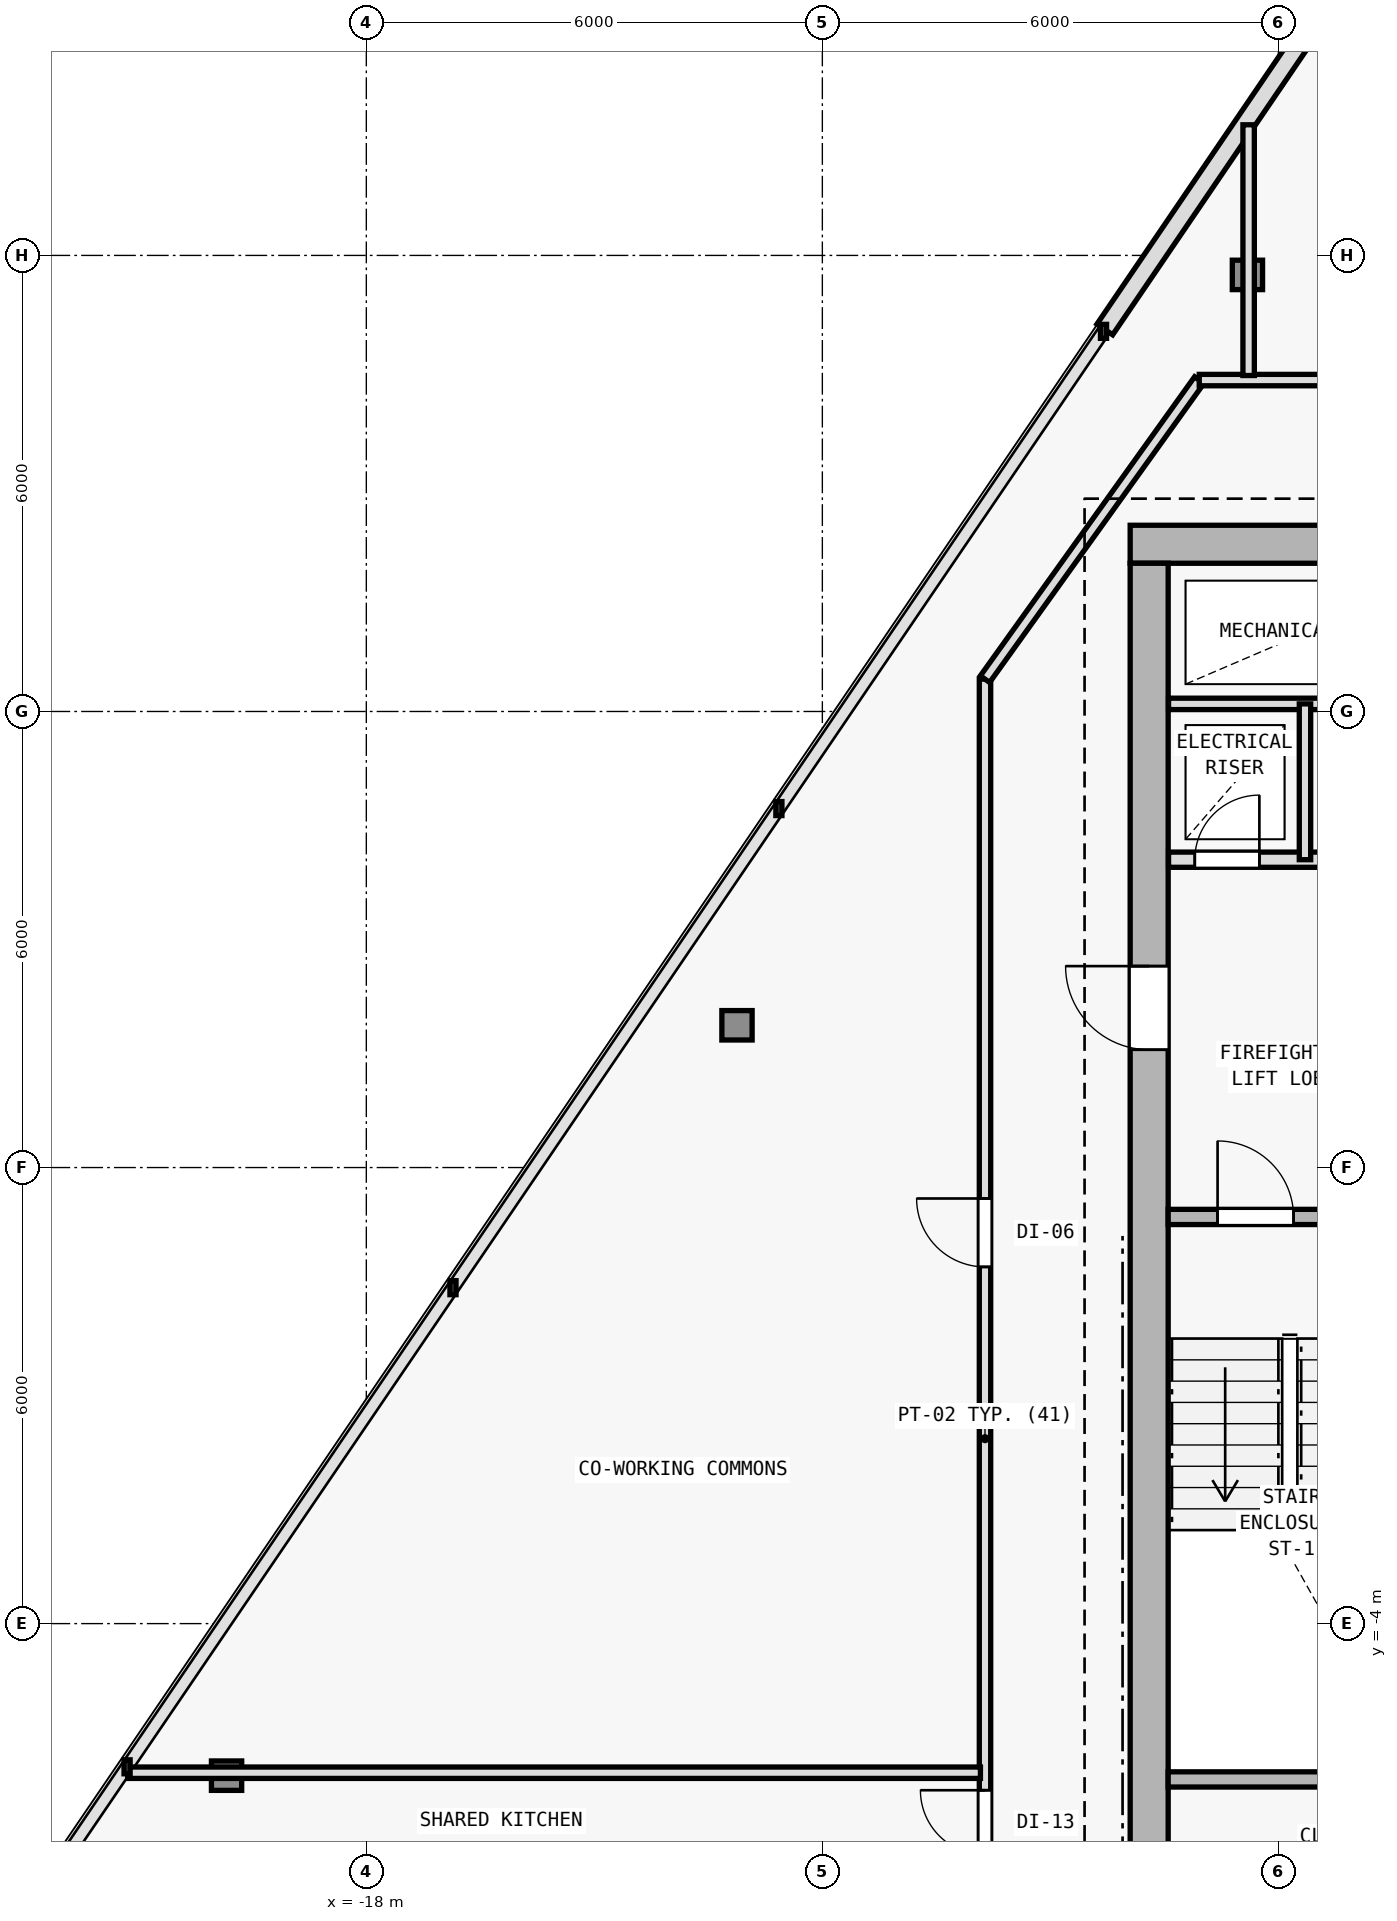
"""IFC4 building model, lengths in metres.
Left out: names, types, materials, properties, quantities, classifications, styles, units other than length and angle.
Written with IfcOpenShell. Run it as: python <this file> out.ifc"""

import sys

from ifc_helpers import new_model, si_unit, direction, frame, frame_2d, origin, origin_2d, place, context, subcontext, project, spatial, rectangle, i_section, extrude, element, fill, save


model = new_model("IFC4")
c1 = context("Model", 3, precision=1e-05, world=origin(), true_north=direction((0.0, 1.0)))
c2 = subcontext(c1, "Body", "Model", "MODEL_VIEW")
j1 = project(units=[si_unit("LENGTHUNIT", "METRE"), si_unit("PLANEANGLEUNIT", "RADIAN")], contexts=[c1])
p1 = place(None, origin())
s1 = spatial("IfcSite", under=j1, at=p1, CompositionType="ELEMENT")
p2 = place(p1, origin())
s2 = spatial("IfcBuilding", under=s1, at=p2, CompositionType="ELEMENT")
p3 = place(p2, frame((0.0, 0.0, 212.7)))
s3 = spatial("IfcBuildingStorey", under=s2, at=p3, CompositionType="ELEMENT", Elevation=212.7)
for number, where, z_axis, x_axis in (
    (1, (-7.7, 10.2, 0.0), (0.0, 0.0, 1.0), (1.0, 0.0, 0.0)),
    (2, (-7.7, 2.0, 0.0), (0.0, 0.0, 1.0), (1.0, 0.0, 0.0)),
):
    element("IfcColumn", number, at=place(p3, frame(where, z_axis=z_axis, x_axis=x_axis)), inside=s3, PredefinedType="COLUMN", context=c2, shape_type="SweptSolid", body=[
        extrude(i_section(OverallWidth=0.398, OverallDepth=0.387, WebThickness=0.013, FlangeThickness=0.022, FilletRadius=0.015, at=origin_2d()), origin(), (0.0, 0.0, 1.0), 3.6),
    ])
p4 = place(p3, frame((-6.407, 13.744, 0.006), z_axis=(0.008843163607, -0.002516900411, 0.999957730942), x_axis=(0.273743828055, 0.961802639112, 0.0)))
e3 = element("IfcColumn", 3, at=p4, inside=s3, PredefinedType="COLUMN", context=c2, shape_type="SweptSolid", body=[
    extrude(i_section(OverallWidth=0.398, OverallDepth=0.387, WebThickness=0.013, FlangeThickness=0.022, FilletRadius=0.015, at=origin_2d()), origin(), (0.0, 0.0, 1.0), 3.589),
])
p5 = place(p3, frame((-13.123, 3.872, 0.006), z_axis=(0.017003572908, 0.009522000828, 0.999810086971), x_axis=(-0.488603368932, 0.87250601595, 0.0)))
e4 = element("IfcColumn", 4, at=p5, inside=s3, PredefinedType="COLUMN", context=c2, shape_type="SweptSolid", body=[
    extrude(i_section(OverallWidth=0.398, OverallDepth=0.387, WebThickness=0.013, FlangeThickness=0.022, FilletRadius=0.015, at=origin_2d()), origin(), (0.0, 0.0, 1.0), 3.59),
])
p6 = place(p3, frame((-19.839, -6.0, 0.006), z_axis=(0.025224200599, 0.021552753612, 0.99944945771), x_axis=(-0.649609258817, 0.760268249278, 0.0)))
e5 = element("IfcColumn", 5, at=p6, inside=s3, PredefinedType="COLUMN", context=c2, shape_type="SweptSolid", body=[
    extrude(i_section(OverallWidth=0.398, OverallDepth=0.387, WebThickness=0.013, FlangeThickness=0.022, FilletRadius=0.015, at=origin_2d()), origin(), (0.0, 0.0, 1.0), 3.591),
])
p7 = place(p3, frame((-8.284, 13.026, 0.0), z_axis=(0.0, 0.0, 1.0), x_axis=(0.562468945091, 0.826818411629, 0.0)))
e6 = element("IfcWall", 6, at=p7, inside=s3, PredefinedType="SOLIDWALL", context=c2, shape_type="SweptSolid", body=[
    extrude(rectangle(XDim=10.714, YDim=0.25, at=frame_2d((5.357, 0.0))), origin(), (0.0, 0.0, 1.0), 3.35),
])
p8 = place(p7, frame((4.657, 0.0, 0.62)))
e7 = element("IfcOpeningElement", 7, at=p8, cuts=e6, PredefinedType="OPENING", context=c2, shape_type="SweptSolid", body=[
    extrude(rectangle(XDim=1.4, YDim=2.0, at=frame_2d((0.7, 1.0))), frame((0.0, 0.135, 0.0), z_axis=(0.0, -1.0, 0.0), x_axis=(1.0, 0.0, 0.0)), (0.0, 0.0, 1.0), 0.27),
])
p9 = place(p3, frame((7.95, 10.2, 0.0), z_axis=(0.0, 0.0, 1.0), x_axis=(-1.0, 0.0, 0.0)))
e8 = element("IfcWall", 8, at=p9, inside=s3, PredefinedType="SHEAR", context=c2, shape_type="SweptSolid", body=[
    extrude(rectangle(XDim=15.9, YDim=0.5, at=frame_2d((7.95, 0.0))), origin(), (0.0, 0.0, 1.0), 3.35),
])
p10 = place(p9, frame((4.4, 0.0, 0.0)))
e9 = element("IfcOpeningElement", 9, at=p10, cuts=e8, PredefinedType="OPENING", context=c2, shape_type="SweptSolid", body=[
    extrude(rectangle(XDim=1.1, YDim=2.15, at=frame_2d((0.55, 1.075))), frame((0.0, 0.26, 0.0), z_axis=(0.0, -1.0, 0.0), x_axis=(1.0, 0.0, 0.0)), (0.0, 0.0, 1.0), 0.52),
])
p11 = place(p3, frame((-7.7, -9.15, 0.0), z_axis=(0.0, 0.0, 1.0), x_axis=(0.0, 1.0, 0.0)))
e10 = element("IfcWall", 10, at=p11, inside=s3, PredefinedType="SHEAR", context=c2, shape_type="SweptSolid", body=[
    extrude(rectangle(XDim=19.1, YDim=0.5, at=frame_2d((9.55, 0.0))), origin(), (0.0, 0.0, 1.0), 3.35),
])
p12 = place(p11, frame((12.7, 0.0, 0.0)))
e11 = element("IfcOpeningElement", 11, at=p12, cuts=e10, PredefinedType="OPENING", context=c2, shape_type="SweptSolid", body=[
    extrude(rectangle(XDim=1.1, YDim=2.15, at=frame_2d((0.55, 1.075))), frame((0.0, 0.26, 0.0), z_axis=(0.0, -1.0, 0.0), x_axis=(1.0, 0.0, 0.0)), (0.0, 0.0, 1.0), 0.52),
])
p13 = place(p3, frame((-7.45, 1.35, 0.0), z_axis=(0.0, 0.0, 1.0), x_axis=(1.0, 0.0, 0.0)))
e12 = element("IfcWall", 12, at=p13, inside=s3, PredefinedType="SOLIDWALL", context=c2, shape_type="SweptSolid", body=[
    extrude(rectangle(XDim=3.4, YDim=0.2, at=frame_2d((1.7, 0.0))), origin(), (0.0, 0.0, 1.0), 3.35),
])
p14 = place(p13, frame((0.65, 0.0, 0.0)))
e13 = element("IfcOpeningElement", 13, at=p14, cuts=e12, PredefinedType="OPENING", context=c2, shape_type="SweptSolid", body=[
    extrude(rectangle(XDim=1.0, YDim=2.15, at=frame_2d((0.5, 1.075))), frame((0.0, 0.11, 0.0), z_axis=(0.0, -1.0, 0.0), x_axis=(1.0, 0.0, 0.0)), (0.0, 0.0, 1.0), 0.22),
])
p15 = place(p3, frame((-7.445, 6.05, 0.0), z_axis=(0.0, 0.0, 1.0), x_axis=(1.0, 0.0, 0.0)))
e14 = element("IfcWall", 14, at=p15, inside=s3, PredefinedType="SOLIDWALL", context=c2, shape_type="SweptSolid", body=[
    extrude(rectangle(XDim=3.595, YDim=0.2, at=frame_2d((1.797, 0.0))), origin(), (0.0, 0.0, 1.0), 3.35),
])
p16 = place(p15, frame((0.345, 0.0, 0.0)))
e15 = element("IfcOpeningElement", 15, at=p16, cuts=e14, PredefinedType="OPENING", context=c2, shape_type="SweptSolid", body=[
    extrude(rectangle(XDim=0.85, YDim=2.1, at=frame_2d((0.425, 1.05))), frame((0.0, 0.11, 0.0), z_axis=(0.0, -1.0, 0.0), x_axis=(1.0, 0.0, 0.0)), (0.0, 0.0, 1.0), 0.22),
])
p17 = place(p15, frame((2.145, 0.0, 0.0)))
e16 = element("IfcOpeningElement", 16, at=p17, cuts=e14, PredefinedType="OPENING", context=c2, shape_type="SweptSolid", body=[
    extrude(rectangle(XDim=0.85, YDim=2.1, at=frame_2d((0.425, 1.05))), frame((0.0, 0.11, 0.0), z_axis=(0.0, -1.0, 0.0), x_axis=(1.0, 0.0, 0.0)), (0.0, 0.0, 1.0), 0.22),
])
p18 = place(p3, frame((-7.445, 8.1, 0.0), z_axis=(0.0, 0.0, 1.0), x_axis=(1.0, 0.0, 0.0)))
e17 = element("IfcWall", 17, at=p18, inside=s3, PredefinedType="PARTITIONING", context=c2, shape_type="SweptSolid", body=[
    extrude(rectangle(XDim=3.595, YDim=0.15, at=frame_2d((1.797, 0.0))), origin(), (0.0, 0.0, 1.0), 3.35),
])
p19 = place(p3, frame((-5.65, 6.05, 0.0), z_axis=(0.0, 0.0, 1.0), x_axis=(0.0, 1.0, 0.0)))
e18 = element("IfcWall", 18, at=p19, inside=s3, PredefinedType="PARTITIONING", context=c2, shape_type="SweptSolid", body=[
    extrude(rectangle(XDim=2.05, YDim=0.15, at=frame_2d((1.025, 0.0))), origin(), (0.0, 0.0, 1.0), 3.35),
])
p20 = place(p3, frame((-7.45, -6.05, 0.0), z_axis=(0.0, 0.0, 1.0), x_axis=(1.0, 0.0, 0.0)))
e19 = element("IfcWall", 19, at=p20, inside=s3, PredefinedType="SOLIDWALL", context=c2, shape_type="SweptSolid", body=[
    extrude(rectangle(XDim=3.4, YDim=0.2, at=frame_2d((1.7, 0.0))), origin(), (0.0, 0.0, 1.0), 3.35),
])
p21 = place(p3, frame((-9.86, -11.56, 0.0), z_axis=(0.0, 0.0, 1.0), x_axis=(0.0, 1.0, 0.0)))
e20 = element("IfcWall", 20, at=p21, inside=s3, PredefinedType="PARTITIONING", context=c2, shape_type="SweptSolid", body=[
    extrude(rectangle(XDim=19.986, YDim=0.15, at=frame_2d((9.993, 0.0))), origin(), (0.0, 0.0, 1.0), 2.825),
])
p22 = place(p21, frame((4.518, 0.0, 0.0)))
e21 = element("IfcOpeningElement", 21, at=p22, cuts=e20, PredefinedType="OPENING", context=c2, shape_type="SweptSolid", body=[
    extrude(rectangle(XDim=0.85, YDim=2.1, at=frame_2d((0.425, 1.05))), frame((0.0, 0.085, 0.0), z_axis=(0.0, -1.0, 0.0), x_axis=(1.0, 0.0, 0.0)), (0.0, 0.0, 1.0), 0.17),
])
p23 = place(p21, frame((3.17, 0.0, 0.0)))
e22 = element("IfcOpeningElement", 22, at=p23, cuts=e20, PredefinedType="OPENING", context=c2, shape_type="SweptSolid", body=[
    extrude(rectangle(XDim=0.85, YDim=2.1, at=frame_2d((0.425, 1.05))), frame((0.0, 0.085, 0.0), z_axis=(0.0, -1.0, 0.0), x_axis=(1.0, 0.0, 0.0)), (0.0, 0.0, 1.0), 0.17),
])
p24 = place(p21, frame((1.09, 0.0, 0.0)))
e23 = element("IfcOpeningElement", 23, at=p24, cuts=e20, PredefinedType="OPENING", context=c2, shape_type="SweptSolid", body=[
    extrude(rectangle(XDim=0.9, YDim=2.1, at=frame_2d((0.45, 1.05))), frame((0.0, 0.085, 0.0), z_axis=(0.0, -1.0, 0.0), x_axis=(1.0, 0.0, 0.0)), (0.0, 0.0, 1.0), 0.17),
])
p25 = place(p21, frame((12.253, 0.0, 0.0)))
e24 = element("IfcOpeningElement", 24, at=p25, cuts=e20, PredefinedType="OPENING", context=c2, shape_type="SweptSolid", body=[
    extrude(rectangle(XDim=0.9, YDim=2.1, at=frame_2d((0.45, 1.05))), frame((0.0, 0.085, 0.0), z_axis=(0.0, -1.0, 0.0), x_axis=(1.0, 0.0, 0.0)), (0.0, 0.0, 1.0), 0.17),
])
p26 = place(p3, frame((-9.86, 8.426, 0.0), z_axis=(0.0, 0.0, 1.0), x_axis=(0.582449511476, 0.812866881218, 0.0)))
e25 = element("IfcWall", 25, at=p26, inside=s3, PredefinedType="PARTITIONING", context=c2, shape_type="SweptSolid", body=[
    extrude(rectangle(XDim=4.84, YDim=0.15, at=frame_2d((2.42, 0.0))), origin(), (0.0, 0.0, 1.0), 2.975),
])
p27 = place(p3, frame((-7.041, 12.36, 0.0), z_axis=(0.0, 0.0, 1.0), x_axis=(1.0, 0.0, 0.0)))
e26 = element("IfcWall", 26, at=p27, inside=s3, PredefinedType="PARTITIONING", context=c2, shape_type="SweptSolid", body=[
    extrude(rectangle(XDim=14.064, YDim=0.15, at=frame_2d((7.032, 0.0))), origin(), (0.0, 0.0, 1.0), 2.975),
])
p28 = place(p27, frame((12.268, 0.0, 0.0)))
e27 = element("IfcOpeningElement", 27, at=p28, cuts=e26, PredefinedType="OPENING", context=c2, shape_type="SweptSolid", body=[
    extrude(rectangle(XDim=0.9, YDim=2.1, at=frame_2d((0.45, 1.05))), frame((0.0, 0.085, 0.0), z_axis=(0.0, -1.0, 0.0), x_axis=(1.0, 0.0, 0.0)), (0.0, 0.0, 1.0), 0.17),
])
p29 = place(p27, frame((9.447, 0.0, 0.0)))
e28 = element("IfcOpeningElement", 28, at=p29, cuts=e26, PredefinedType="OPENING", context=c2, shape_type="SweptSolid", body=[
    extrude(rectangle(XDim=0.9, YDim=2.1, at=frame_2d((0.45, 1.05))), frame((0.0, 0.085, 0.0), z_axis=(0.0, -1.0, 0.0), x_axis=(1.0, 0.0, 0.0)), (0.0, 0.0, 1.0), 0.17),
])
p30 = place(p27, frame((3.997, 0.0, 0.0)))
e29 = element("IfcOpeningElement", 29, at=p30, cuts=e26, PredefinedType="OPENING", context=c2, shape_type="SweptSolid", body=[
    extrude(rectangle(XDim=0.9, YDim=2.1, at=frame_2d((0.45, 1.05))), frame((0.0, 0.085, 0.0), z_axis=(0.0, -1.0, 0.0), x_axis=(1.0, 0.0, 0.0)), (0.0, 0.0, 1.0), 0.17),
])
p31 = place(p3, frame((-6.391, 12.42, 0.0), z_axis=(0.0, 0.0, 1.0), x_axis=(0.0, 1.0, 0.0)))
e30 = element("IfcWall", 30, at=p31, inside=s3, PredefinedType="PARTITIONING", context=c2, shape_type="SweptSolid", body=[
    extrude(rectangle(XDim=3.299, YDim=0.15, at=frame_2d((1.649, 0.0))), origin(), (0.0, 0.0, 1.0), 2.975),
])
p32 = place(p3, frame((-9.92, -5.962, 0.0), z_axis=(0.0, 0.0, 1.0), x_axis=(-1.0, 0.0, 0.0)))
e31 = element("IfcWall", 31, at=p32, inside=s3, PredefinedType="PARTITIONING", context=c2, shape_type="SweptSolid", body=[
    extrude(rectangle(XDim=11.22, YDim=0.15, at=frame_2d((5.61, 0.0))), origin(), (0.0, 0.0, 1.0), 2.825),
])
p33 = place(p12, origin())
e32 = element("IfcDoor", 32, at=p33, inside=s3, OperationType="SINGLE_SWING_RIGHT", PredefinedType="DOOR", context=c2, shape_type="SweptSolid", body=[
    extrude(rectangle(XDim=1.1, YDim=2.15, at=frame_2d((0.55, 1.075))), frame((0.0, 0.025, 0.0), z_axis=(0.0, -1.0, 0.0), x_axis=(1.0, 0.0, 0.0)), (0.0, 0.0, 1.0), 0.05),
])
fill(e11, e32)
p34 = place(p14, origin())
e33 = element("IfcDoor", 33, at=p34, inside=s3, OperationType="SINGLE_SWING_LEFT", PredefinedType="DOOR", context=c2, shape_type="SweptSolid", body=[
    extrude(rectangle(XDim=1.0, YDim=2.15, at=frame_2d((0.5, 1.075))), frame((0.0, 0.025, 0.0), z_axis=(0.0, -1.0, 0.0), x_axis=(1.0, 0.0, 0.0)), (0.0, 0.0, 1.0), 0.05),
])
fill(e13, e33)
p35 = place(p16, origin())
e34 = element("IfcDoor", 34, at=p35, inside=s3, OperationType="SINGLE_SWING_RIGHT", PredefinedType="DOOR", context=c2, shape_type="SweptSolid", body=[
    extrude(rectangle(XDim=0.85, YDim=2.1, at=frame_2d((0.425, 1.05))), frame((0.0, 0.025, 0.0), z_axis=(0.0, -1.0, 0.0), x_axis=(1.0, 0.0, 0.0)), (0.0, 0.0, 1.0), 0.05),
])
fill(e15, e34)
p36 = place(p22, origin())
e35 = element("IfcDoor", 35, at=p36, inside=s3, OperationType="SINGLE_SWING_RIGHT", PredefinedType="DOOR", context=c2, shape_type="SweptSolid", body=[
    extrude(rectangle(XDim=0.85, YDim=2.1, at=frame_2d((0.425, 1.05))), frame((0.0, 0.025, 0.0), z_axis=(0.0, -1.0, 0.0), x_axis=(1.0, 0.0, 0.0)), (0.0, 0.0, 1.0), 0.05),
])
fill(e21, e35)
p37 = place(p25, origin())
e36 = element("IfcDoor", 36, at=p37, inside=s3, OperationType="SINGLE_SWING_RIGHT", PredefinedType="DOOR", context=c2, shape_type="SweptSolid", body=[
    extrude(rectangle(XDim=0.9, YDim=2.1, at=frame_2d((0.45, 1.05))), frame((0.0, 0.025, 0.0), z_axis=(0.0, -1.0, 0.0), x_axis=(1.0, 0.0, 0.0)), (0.0, 0.0, 1.0), 0.05),
])
fill(e24, e36)
save(model, sys.argv[1])
